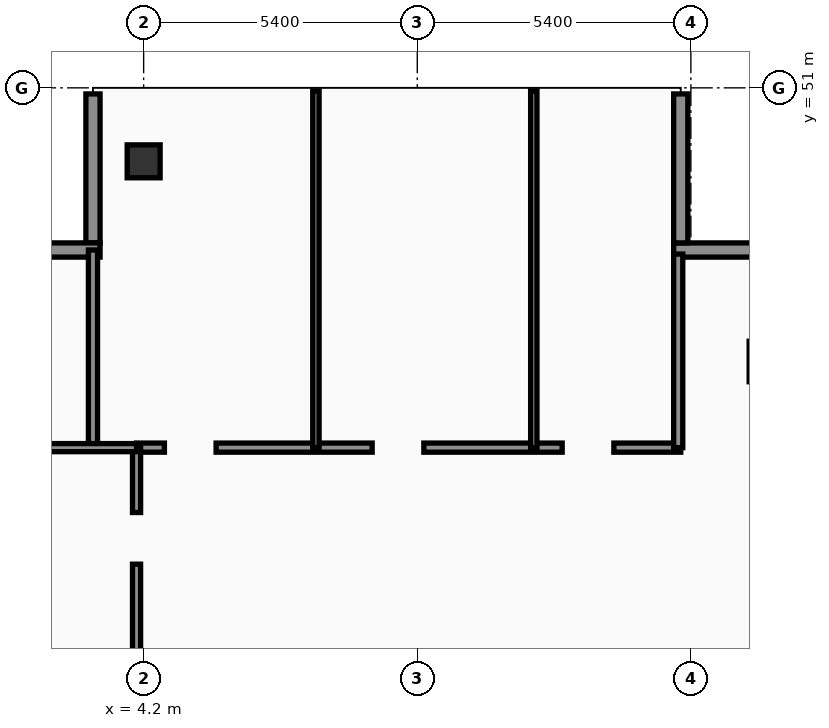
"""IFC4 building model, lengths in metres.
Left out: names, types, materials, properties, quantities, classifications, styles, units other than length and angle.
Written with IfcOpenShell. Run it as: python <this file> out.ifc"""

import sys

from ifc_helpers import new_model, si_unit, direction, frame, frame_2d, origin, origin_2d, place, context, subcontext, project, spatial, rectangle, hollow_rectangle, extrude, element, fill, save


model = new_model("IFC4")
c1 = context("Model", 3, precision=1e-05, world=origin(), true_north=direction((0.0, 1.0)))
c2 = subcontext(c1, "Body", "Model", "MODEL_VIEW")
j1 = project(units=[si_unit("LENGTHUNIT", "METRE"), si_unit("PLANEANGLEUNIT", "RADIAN")], contexts=[c1])
p1 = place(None, origin())
s1 = spatial("IfcSite", under=j1, at=p1, CompositionType="ELEMENT")
p2 = place(p1, origin())
s2 = spatial("IfcBuilding", under=s1, at=p2, CompositionType="ELEMENT")
p3 = place(p2, frame((0.0, 0.0, 307.0)))
s3 = spatial("IfcBuildingStorey", under=s2, at=p3, CompositionType="ELEMENT", Elevation=307.0)
p4 = place(p3, frame((4.2, 49.55, 0.0), z_axis=(0.0, 0.0, 1.0), x_axis=(1.0, 0.0, 0.0)))
e1 = element("IfcColumn", 1, at=p4, inside=s3, PredefinedType="COLUMN", context=c2, shape_type="SweptSolid", body=[
    extrude(hollow_rectangle(XDim=0.65, YDim=0.65, WallThickness=0.028, at=origin_2d()), origin(), (0.0, 0.0, 1.0), 4.26),
])
p5 = place(p3, frame((17.9, 47.8, 0.0), z_axis=(0.0, 0.0, 1.0), x_axis=(-1.0, 0.0, 0.0)))
e2 = element("IfcWall", 2, at=p5, inside=s3, PredefinedType="SOLIDWALL", context=c2, shape_type="SweptSolid", body=[
    extrude(rectangle(XDim=3.24, YDim=0.28, at=frame_2d((1.62, 0.0))), origin(), (0.0, 0.0, 1.0), 4.26),
])
p6 = place(p3, frame((14.8, 47.94, 0.0), z_axis=(0.0, 0.0, 1.0), x_axis=(0.0, 1.0, 0.0)))
e3 = element("IfcWall", 3, at=p6, inside=s3, PredefinedType="SOLIDWALL", context=c2, shape_type="SweptSolid", body=[
    extrude(rectangle(XDim=2.94, YDim=0.28, at=frame_2d((1.47, 0.0))), origin(), (0.0, 0.0, 1.0), 4.26),
])
p7 = place(p3, frame((3.2, 50.88, 0.0), z_axis=(0.0, 0.0, 1.0), x_axis=(0.0, -1.0, 0.0)))
e4 = element("IfcWall", 4, at=p7, inside=s3, PredefinedType="SOLIDWALL", context=c2, shape_type="SweptSolid", body=[
    extrude(rectangle(XDim=2.94, YDim=0.28, at=frame_2d((1.47, 0.0))), origin(), (0.0, 0.0, 1.0), 3.79),
])
p8 = place(p3, frame((3.34, 47.8, 0.0), z_axis=(0.0, 0.0, 1.0), x_axis=(-1.0, 0.0, 0.0)))
e5 = element("IfcWall", 5, at=p8, inside=s3, PredefinedType="SOLIDWALL", context=c2, shape_type="SweptSolid", body=[
    extrude(rectangle(XDim=3.22, YDim=0.28, at=frame_2d((1.61, 0.0))), origin(), (0.0, 0.0, 1.0), 3.79),
])
p9 = place(p3, frame((3.2, 43.9, 0.0), z_axis=(0.0, 0.0, 1.0), x_axis=(0.0, 1.0, 0.0)))
e6 = element("IfcWall", 6, at=p9, inside=s3, PredefinedType="PARTITIONING", context=c2, shape_type="SweptSolid", body=[
    extrude(rectangle(XDim=3.9, YDim=0.18, at=frame_2d((1.95, 0.0))), origin(), (0.0, 0.0, 1.0), 4.26),
])
p10 = place(p3, frame((4.06, 43.9, 0.0), z_axis=(0.0, 0.0, 1.0), x_axis=(1.0, 0.0, 0.0)))
e7 = element("IfcWall", 7, at=p10, inside=s3, PredefinedType="PARTITIONING", context=c2, shape_type="SweptSolid", body=[
    extrude(rectangle(XDim=10.74, YDim=0.18, at=frame_2d((5.37, 0.0))), origin(), (0.0, 0.0, 1.0), 3.69),
])
p11 = place(p10, frame((0.55, 0.0, 0.0)))
e8 = element("IfcOpeningElement", 8, at=p11, cuts=e7, PredefinedType="OPENING", context=c2, shape_type="SweptSolid", body=[
    extrude(rectangle(XDim=1.02, YDim=2.2, at=frame_2d((0.51, 1.1))), frame((0.0, 0.1, 0.0), z_axis=(0.0, -1.0, 0.0), x_axis=(1.0, 0.0, 0.0)), (0.0, 0.0, 1.0), 0.2),
])
p12 = place(p10, frame((4.65, 0.0, 0.0)))
e9 = element("IfcOpeningElement", 9, at=p12, cuts=e7, PredefinedType="OPENING", context=c2, shape_type="SweptSolid", body=[
    extrude(rectangle(XDim=1.02, YDim=2.2, at=frame_2d((0.51, 1.1))), frame((0.0, 0.1, 0.0), z_axis=(0.0, -1.0, 0.0), x_axis=(1.0, 0.0, 0.0)), (0.0, 0.0, 1.0), 0.2),
])
p13 = place(p10, frame((8.4, 0.0, 0.0)))
e10 = element("IfcOpeningElement", 10, at=p13, cuts=e7, PredefinedType="OPENING", context=c2, shape_type="SweptSolid", body=[
    extrude(rectangle(XDim=1.02, YDim=2.2, at=frame_2d((0.51, 1.1))), frame((0.0, 0.1, 0.0), z_axis=(0.0, -1.0, 0.0), x_axis=(1.0, 0.0, 0.0)), (0.0, 0.0, 1.0), 0.2),
])
p14 = place(p3, frame((4.06, 38.4, 0.0), z_axis=(0.0, 0.0, 1.0), x_axis=(0.0, 1.0, 0.0)))
e11 = element("IfcWall", 11, at=p14, inside=s3, PredefinedType="PARTITIONING", context=c2, shape_type="SweptSolid", body=[
    extrude(rectangle(XDim=5.5, YDim=0.16, at=frame_2d((2.75, 0.0))), origin(), (0.0, 0.0, 1.0), 3.69),
])
p15 = place(p14, frame((3.2, 0.0, 0.0)))
e12 = element("IfcOpeningElement", 12, at=p15, cuts=e11, PredefinedType="OPENING", context=c2, shape_type="SweptSolid", body=[
    extrude(rectangle(XDim=1.02, YDim=2.2, at=frame_2d((0.51, 1.1))), frame((0.0, 0.09, 0.0), z_axis=(0.0, -1.0, 0.0), x_axis=(1.0, 0.0, 0.0)), (0.0, 0.0, 1.0), 0.18),
])
p16 = place(p3, frame((0.08, 43.9, 0.0), z_axis=(0.0, 0.0, 1.0), x_axis=(1.0, 0.0, 0.0)))
e13 = element("IfcWall", 13, at=p16, inside=s3, PredefinedType="PARTITIONING", context=c2, shape_type="SweptSolid", body=[
    extrude(rectangle(XDim=3.98, YDim=0.16, at=frame_2d((1.99, 0.0))), origin(), (0.0, 0.0, 1.0), 3.69),
])
p17 = place(p3, frame((14.75, 43.9, 0.0), z_axis=(0.0, 0.0, 1.0), x_axis=(0.0, 1.0, 0.0)))
e14 = element("IfcWall", 14, at=p17, inside=s3, PredefinedType="PARTITIONING", context=c2, shape_type="SweptSolid", body=[
    extrude(rectangle(XDim=3.82, YDim=0.18, at=frame_2d((1.91, 0.0))), origin(), (0.0, 0.0, 1.0), 3.79),
])
for number, where, z_axis, x_axis in (
    (15, (7.6, 43.9, 0.0), (0.0, 0.0, 1.0), (0.0, 1.0, 0.0)),
    (16, (11.9, 43.9, 0.0), (0.0, 0.0, 1.0), (0.0, 1.0, 0.0)),
):
    element("IfcWall", number, at=place(p3, frame(where, z_axis=z_axis, x_axis=x_axis)), inside=s3, PredefinedType="PARTITIONING", context=c2, shape_type="SweptSolid", body=[
        extrude(rectangle(XDim=7.04, YDim=0.125, at=frame_2d((3.52, 0.0))), origin(), (0.0, 0.0, 1.0), 3.79),
    ])
p18 = place(p11, origin())
e17 = element("IfcDoor", 17, at=p18, inside=s3, OperationType="SINGLE_SWING_LEFT", PredefinedType="DOOR", context=c2, shape_type="SweptSolid", body=[
    extrude(rectangle(XDim=1.02, YDim=2.2, at=frame_2d((0.51, 1.1))), frame((0.0, 0.025, 0.0), z_axis=(0.0, -1.0, 0.0), x_axis=(1.0, 0.0, 0.0)), (0.0, 0.0, 1.0), 0.05),
])
fill(e8, e17)
p19 = place(p12, origin())
e18 = element("IfcDoor", 18, at=p19, inside=s3, OperationType="SINGLE_SWING_RIGHT", PredefinedType="DOOR", context=c2, shape_type="SweptSolid", body=[
    extrude(rectangle(XDim=1.02, YDim=2.2, at=frame_2d((0.51, 1.1))), frame((0.0, 0.025, 0.0), z_axis=(0.0, -1.0, 0.0), x_axis=(1.0, 0.0, 0.0)), (0.0, 0.0, 1.0), 0.05),
])
fill(e9, e18)
p20 = place(p13, origin())
e19 = element("IfcDoor", 19, at=p20, inside=s3, OperationType="SINGLE_SWING_LEFT", PredefinedType="DOOR", context=c2, shape_type="SweptSolid", body=[
    extrude(rectangle(XDim=1.02, YDim=2.2, at=frame_2d((0.51, 1.1))), frame((0.0, 0.025, 0.0), z_axis=(0.0, -1.0, 0.0), x_axis=(1.0, 0.0, 0.0)), (0.0, 0.0, 1.0), 0.05),
])
fill(e10, e19)
p21 = place(p15, origin())
e20 = element("IfcDoor", 20, at=p21, inside=s3, OperationType="SINGLE_SWING_LEFT", PredefinedType="DOOR", context=c2, shape_type="SweptSolid", body=[
    extrude(rectangle(XDim=1.02, YDim=2.2, at=frame_2d((0.51, 1.1))), frame((0.0, 0.025, 0.0), z_axis=(0.0, -1.0, 0.0), x_axis=(1.0, 0.0, 0.0)), (0.0, 0.0, 1.0), 0.05),
])
fill(e12, e20)
save(model, sys.argv[1])
